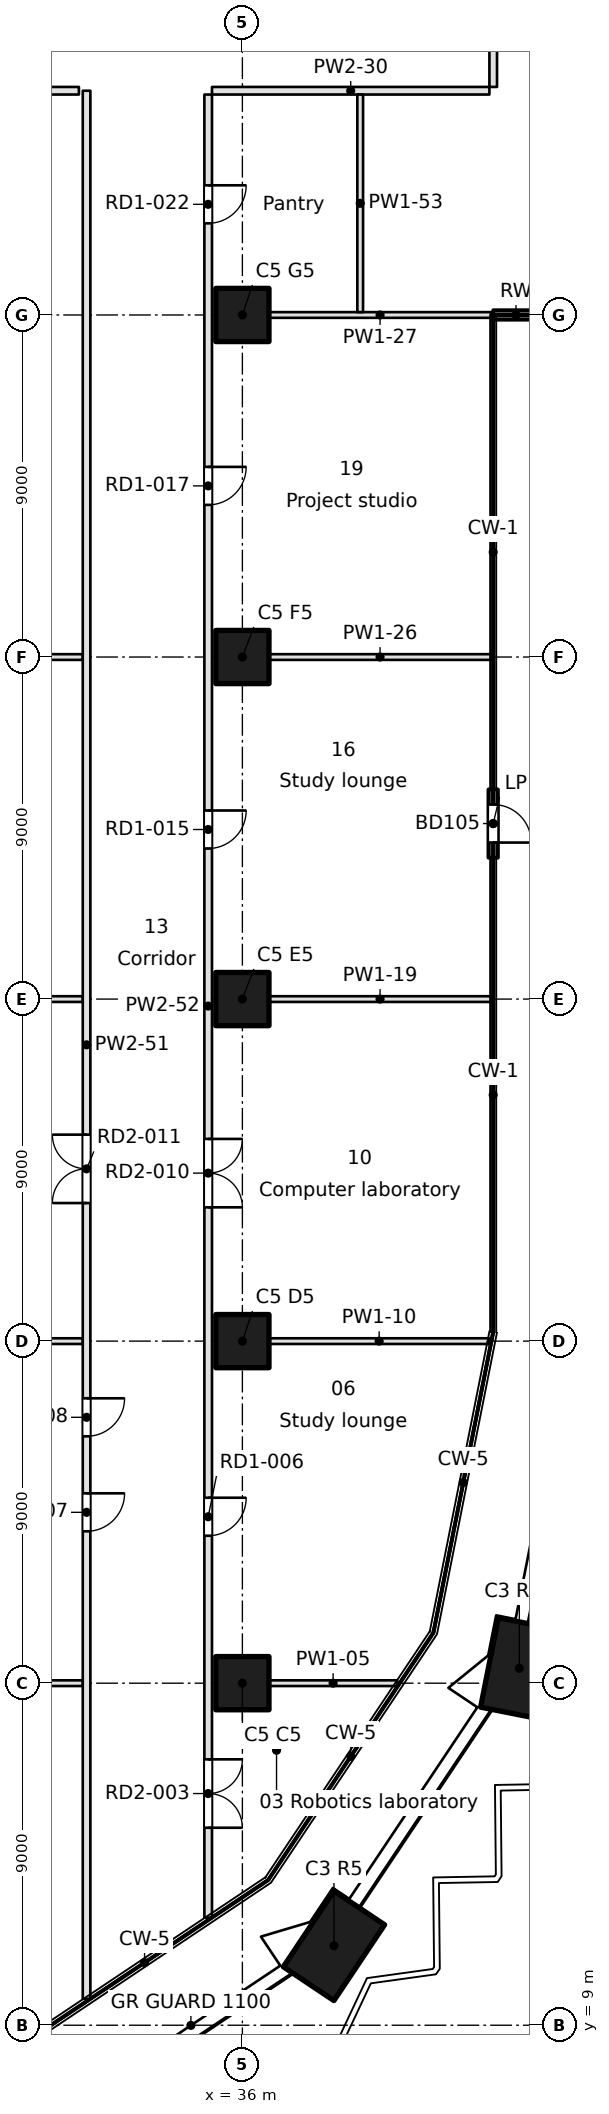
"""IFC4 building model, lengths in metres.
Left out: names, types, materials, properties, quantities, classifications, styles, units other than length and angle.
Written with IfcOpenShell. Run it as: python <this file> out.ifc"""

import sys

from ifc_helpers import new_model, si_unit, direction, frame, frame_2d, origin, origin_2d, place, context, subcontext, project, spatial, rectangle, extrude, element, fill, save


model = new_model("IFC4")
c1 = context("Model", 3, precision=1e-05, world=origin(), true_north=direction((0.0, 1.0)))
c2 = subcontext(c1, "Body", "Model", "MODEL_VIEW")
j1 = project(units=[si_unit("LENGTHUNIT", "METRE"), si_unit("PLANEANGLEUNIT", "RADIAN")], contexts=[c1])
p1 = place(None, origin())
s1 = spatial("IfcSite", under=j1, at=p1, CompositionType="ELEMENT")
p2 = place(p1, origin())
s2 = spatial("IfcBuilding", under=s1, at=p2, CompositionType="ELEMENT")
p3 = place(p2, frame((0.0, 0.0, 35.8)))
s3 = spatial("IfcBuildingStorey", under=s2, at=p3, CompositionType="ELEMENT", Elevation=35.8)
for number, where, z_axis, x_axis in (
    (1, (38.41, 11.09, 0.0), (0.0, 0.0, 1.0), (0.556, 0.831, 0.0)),
    (2, (43.287, 18.39, 0.0), (0.0, 0.0, 1.0), (0.195, 0.981, 0.0)),
):
    element("IfcColumn", number, at=place(p3, frame(where, z_axis=z_axis, x_axis=x_axis)), inside=s3, PredefinedType="COLUMN", context=c2, shape_type="SweptSolid", body=[
        extrude(rectangle(XDim=2.4, YDim=1.6, at=origin_2d()), origin(), (0.0, 0.0, 1.0), 3.7),
    ])
for number, where, z_axis, x_axis in (
    (3, (36.0, 18.0, 0.0), (0.0, 0.0, 1.0), (1.0, 0.0, 0.0)),
    (4, (36.0, 27.0, 0.0), (0.0, 0.0, 1.0), (1.0, 0.0, 0.0)),
    (5, (36.0, 36.0, 0.0), (0.0, 0.0, 1.0), (1.0, 0.0, 0.0)),
    (6, (36.0, 45.0, 0.0), (0.0, 0.0, 1.0), (1.0, 0.0, 0.0)),
    (7, (36.0, 54.0, 0.0), (0.0, 0.0, 1.0), (1.0, 0.0, 0.0)),
):
    element("IfcColumn", number, at=place(p3, frame(where, z_axis=z_axis, x_axis=x_axis)), inside=s3, PredefinedType="COLUMN", context=c2, shape_type="SweptSolid", body=[
        extrude(rectangle(XDim=1.4, YDim=1.4, at=origin_2d()), origin(), (0.0, 0.0, 1.0), 3.7),
    ])
p4 = place(p3, frame((42.599, 39.718, 0.0), z_axis=(0.0, 0.0, 1.0), x_axis=(0.0, 1.0, 0.0)))
e8 = element("IfcWall", 8, at=p4, inside=s3, PredefinedType="SOLIDWALL", context=c2, shape_type="SweptSolid", body=[
    extrude(rectangle(XDim=1.8, YDim=0.25, at=frame_2d((0.9, 0.0))), origin(), (0.0, 0.0, 1.0), 3.3),
])
p5 = place(p4, frame((0.4, 0.0, 0.0)))
e9 = element("IfcOpeningElement", 9, at=p5, cuts=e8, PredefinedType="OPENING", context=c2, shape_type="SweptSolid", body=[
    extrude(rectangle(XDim=1.0, YDim=2.1, at=frame_2d((0.5, 1.05))), frame((0.0, 0.125, 0.0), z_axis=(0.0, -1.0, 0.0), x_axis=(1.0, 0.0, 0.0)), (0.0, 0.0, 1.0), 0.25),
])
p6 = place(p3, frame((42.599, 54.0, 0.0), z_axis=(0.0, 0.0, 1.0), x_axis=(0.999999917344, 0.000406586671, 0.0)))
e10 = element("IfcWall", 10, at=p6, inside=s3, PredefinedType="SOLIDWALL", context=c2, shape_type="SweptSolid", body=[
    extrude(rectangle(XDim=1.201, YDim=0.25, at=frame_2d((0.601, 0.0))), origin(), (0.0, 0.0, 1.0), 3.3),
])
p7 = place(p3, frame((28.2, 18.0, 0.0), z_axis=(0.0, 0.0, 1.0), x_axis=(1.0, 0.0, 0.0)))
e11 = element("IfcWall", 11, at=p7, inside=s3, PredefinedType="PARTITIONING", context=c2, shape_type="SweptSolid", body=[
    extrude(rectangle(XDim=3.6, YDim=0.15, at=frame_2d((1.8, 0.0))), origin(), (0.0, 0.0, 1.0), 3.3),
])
p8 = place(p3, frame((36.7, 18.0, 0.0), z_axis=(0.0, 0.0, 1.0), x_axis=(1.0, 0.0, 0.0)))
e12 = element("IfcWall", 12, at=p8, inside=s3, PredefinedType="PARTITIONING", context=c2, shape_type="SweptSolid", body=[
    extrude(rectangle(XDim=3.375, YDim=0.15, at=frame_2d((1.687, 0.0))), origin(), (0.0, 0.0, 1.0), 3.3),
])
p9 = place(p3, frame((27.7, 27.0, 0.0), z_axis=(0.0, 0.0, 1.0), x_axis=(1.0, 0.0, 0.0)))
e13 = element("IfcWall", 13, at=p9, inside=s3, PredefinedType="PARTITIONING", context=c2, shape_type="SweptSolid", body=[
    extrude(rectangle(XDim=4.1, YDim=0.15, at=frame_2d((2.05, 0.0))), origin(), (0.0, 0.0, 1.0), 3.3),
])
p10 = place(p3, frame((36.7, 27.0, 0.0), z_axis=(0.0, 0.0, 1.0), x_axis=(1.0, 0.0, 0.0)))
e14 = element("IfcWall", 14, at=p10, inside=s3, PredefinedType="PARTITIONING", context=c2, shape_type="SweptSolid", body=[
    extrude(rectangle(XDim=5.797, YDim=0.15, at=frame_2d((2.898, 0.0))), origin(), (0.0, 0.0, 1.0), 3.3),
])
p11 = place(p3, frame((27.7, 36.0, 0.0), z_axis=(0.0, 0.0, 1.0), x_axis=(1.0, 0.0, 0.0)))
e15 = element("IfcWall", 15, at=p11, inside=s3, PredefinedType="PARTITIONING", context=c2, shape_type="SweptSolid", body=[
    extrude(rectangle(XDim=4.1, YDim=0.15, at=frame_2d((2.05, 0.0))), origin(), (0.0, 0.0, 1.0), 3.3),
])
p12 = place(p3, frame((36.7, 36.0, 0.0), z_axis=(0.0, 0.0, 1.0), x_axis=(1.0, 0.0, 0.0)))
e16 = element("IfcWall", 16, at=p12, inside=s3, PredefinedType="PARTITIONING", context=c2, shape_type="SweptSolid", body=[
    extrude(rectangle(XDim=5.845, YDim=0.15, at=frame_2d((2.922, 0.0))), origin(), (0.0, 0.0, 1.0), 3.3),
])
p13 = place(p3, frame((27.7, 45.0, 0.0), z_axis=(0.0, 0.0, 1.0), x_axis=(1.0, 0.0, 0.0)))
e17 = element("IfcWall", 17, at=p13, inside=s3, PredefinedType="PARTITIONING", context=c2, shape_type="SweptSolid", body=[
    extrude(rectangle(XDim=4.1, YDim=0.15, at=frame_2d((2.05, 0.0))), origin(), (0.0, 0.0, 1.0), 3.3),
])
for number, where, z_axis, x_axis in (
    (18, (36.7, 45.0, 0.0), (0.0, 0.0, 1.0), (1.0, 0.0, 0.0)),
    (19, (36.7, 54.0, 0.0), (0.0, 0.0, 1.0), (1.0, 0.0, 0.0)),
):
    element("IfcWall", number, at=place(p3, frame(where, z_axis=z_axis, x_axis=x_axis)), inside=s3, PredefinedType="PARTITIONING", context=c2, shape_type="SweptSolid", body=[
        extrude(rectangle(XDim=5.845, YDim=0.15, at=frame_2d((2.922, 0.0))), origin(), (0.0, 0.0, 1.0), 3.3),
    ])
p14 = place(p3, frame((31.698, 59.9, 0.0), z_axis=(0.0, 0.0, 1.0), x_axis=(-1.0, 0.0, 0.0)))
e20 = element("IfcWall", 20, at=p14, inside=s3, PredefinedType="PARTITIONING", context=c2, shape_type="SweptSolid", body=[
    extrude(rectangle(XDim=14.37, YDim=0.2, at=frame_2d((7.185, 0.0))), origin(), (0.0, 0.0, 1.0), 3.3),
])
p15 = place(p3, frame((42.5, 59.9, 0.0), z_axis=(0.0, 0.0, 1.0), x_axis=(-1.0, 0.0, 0.0)))
e21 = element("IfcWall", 21, at=p15, inside=s3, PredefinedType="PARTITIONING", context=c2, shape_type="SweptSolid", body=[
    extrude(rectangle(XDim=7.3, YDim=0.2, at=frame_2d((3.65, 0.0))), origin(), (0.0, 0.0, 1.0), 3.3),
])
p16 = place(p3, frame((31.9, 9.693, 0.0), z_axis=(0.0, 0.0, 1.0), x_axis=(0.0, 1.0, 0.0)))
e22 = element("IfcWall", 22, at=p16, inside=s3, PredefinedType="PARTITIONING", context=c2, shape_type="SweptSolid", body=[
    extrude(rectangle(XDim=50.207, YDim=0.2, at=frame_2d((25.104, 0.0))), origin(), (0.0, 0.0, 1.0), 3.3),
])
p17 = place(p16, frame((12.303, 0.0, 0.0)))
e23 = element("IfcOpeningElement", 23, at=p17, cuts=e22, PredefinedType="OPENING", context=c2, shape_type="SweptSolid", body=[
    extrude(rectangle(XDim=1.0, YDim=2.1, at=frame_2d((0.5, 1.05))), frame((0.0, 0.1, 0.0), z_axis=(0.0, -1.0, 0.0), x_axis=(1.0, 0.0, 0.0)), (0.0, 0.0, 1.0), 0.2),
])
p18 = place(p16, frame((14.803, 0.0, 0.0)))
e24 = element("IfcOpeningElement", 24, at=p18, cuts=e22, PredefinedType="OPENING", context=c2, shape_type="SweptSolid", body=[
    extrude(rectangle(XDim=1.0, YDim=2.1, at=frame_2d((0.5, 1.05))), frame((0.0, 0.1, 0.0), z_axis=(0.0, -1.0, 0.0), x_axis=(1.0, 0.0, 0.0)), (0.0, 0.0, 1.0), 0.2),
])
p19 = place(p16, frame((20.94, 0.0, 0.0)))
e25 = element("IfcOpeningElement", 25, at=p19, cuts=e22, PredefinedType="OPENING", context=c2, shape_type="SweptSolid", body=[
    extrude(rectangle(XDim=1.8, YDim=2.1, at=frame_2d((0.9, 1.05))), frame((0.0, 0.1, 0.0), z_axis=(0.0, -1.0, 0.0), x_axis=(1.0, 0.0, 0.0)), (0.0, 0.0, 1.0), 0.2),
])
p20 = place(p3, frame((35.1, 59.8, 0.0), z_axis=(0.0, 0.0, 1.0), x_axis=(0.0, -1.0, 0.0)))
e26 = element("IfcWall", 26, at=p20, inside=s3, PredefinedType="PARTITIONING", context=c2, shape_type="SweptSolid", body=[
    extrude(rectangle(XDim=47.969, YDim=0.2, at=frame_2d((23.984, 0.0))), origin(), (0.0, 0.0, 1.0), 3.3),
])
p21 = place(p20, frame((43.804, 0.0, 0.0)))
e27 = element("IfcOpeningElement", 27, at=p21, cuts=e26, PredefinedType="OPENING", context=c2, shape_type="SweptSolid", body=[
    extrude(rectangle(XDim=1.8, YDim=2.1, at=frame_2d((0.9, 1.05))), frame((0.0, 0.1, 0.0), z_axis=(0.0, -1.0, 0.0), x_axis=(1.0, 0.0, 0.0)), (0.0, 0.0, 1.0), 0.2),
])
p22 = place(p20, frame((36.921, 0.0, 0.0)))
e28 = element("IfcOpeningElement", 28, at=p22, cuts=e26, PredefinedType="OPENING", context=c2, shape_type="SweptSolid", body=[
    extrude(rectangle(XDim=1.0, YDim=2.1, at=frame_2d((0.5, 1.05))), frame((0.0, 0.1, 0.0), z_axis=(0.0, -1.0, 0.0), x_axis=(1.0, 0.0, 0.0)), (0.0, 0.0, 1.0), 0.2),
])
p23 = place(p20, frame((27.479, 0.0, 0.0)))
e29 = element("IfcOpeningElement", 29, at=p23, cuts=e26, PredefinedType="OPENING", context=c2, shape_type="SweptSolid", body=[
    extrude(rectangle(XDim=1.8, YDim=2.1, at=frame_2d((0.9, 1.05))), frame((0.0, 0.1, 0.0), z_axis=(0.0, -1.0, 0.0), x_axis=(1.0, 0.0, 0.0)), (0.0, 0.0, 1.0), 0.2),
])
p24 = place(p20, frame((18.838, 0.0, 0.0)))
e30 = element("IfcOpeningElement", 30, at=p24, cuts=e26, PredefinedType="OPENING", context=c2, shape_type="SweptSolid", body=[
    extrude(rectangle(XDim=1.0, YDim=2.1, at=frame_2d((0.5, 1.05))), frame((0.0, 0.1, 0.0), z_axis=(0.0, -1.0, 0.0), x_axis=(1.0, 0.0, 0.0)), (0.0, 0.0, 1.0), 0.2),
])
p25 = place(p20, frame((9.797, 0.0, 0.0)))
e31 = element("IfcOpeningElement", 31, at=p25, cuts=e26, PredefinedType="OPENING", context=c2, shape_type="SweptSolid", body=[
    extrude(rectangle(XDim=1.0, YDim=2.1, at=frame_2d((0.5, 1.05))), frame((0.0, 0.1, 0.0), z_axis=(0.0, -1.0, 0.0), x_axis=(1.0, 0.0, 0.0)), (0.0, 0.0, 1.0), 0.2),
])
p26 = place(p20, frame((2.388, 0.0, 0.0)))
e32 = element("IfcOpeningElement", 32, at=p26, cuts=e26, PredefinedType="OPENING", context=c2, shape_type="SweptSolid", body=[
    extrude(rectangle(XDim=1.0, YDim=2.1, at=frame_2d((0.5, 1.05))), frame((0.0, 0.1, 0.0), z_axis=(0.0, -1.0, 0.0), x_axis=(1.0, 0.0, 0.0)), (0.0, 0.0, 1.0), 0.2),
])
p27 = place(p3, frame((39.1, 59.8, 0.0), z_axis=(0.0, 0.0, 1.0), x_axis=(0.0, -1.0, 0.0)))
e33 = element("IfcWall", 33, at=p27, inside=s3, PredefinedType="PARTITIONING", context=c2, shape_type="SweptSolid", body=[
    extrude(rectangle(XDim=5.725, YDim=0.15, at=frame_2d((2.863, 0.0))), origin(), (0.0, 0.0, 1.0), 3.3),
])
p28 = place(p3, frame((42.6, 63.6, 0.0), z_axis=(0.0, 0.0, 1.0), x_axis=(0.0, -1.0, 0.0)))
e34 = element("IfcWall", 34, at=p28, inside=s3, PredefinedType="PARTITIONING", context=c2, shape_type="SweptSolid", body=[
    extrude(rectangle(XDim=3.6, YDim=0.2, at=frame_2d((1.8, 0.0))), origin(), (0.0, 0.0, 1.0), 3.3),
])
p29 = place(p5, frame((1.0, 0.0, 0.0), z_axis=(0.0, 0.0, 1.0), x_axis=(-1.0, 0.0, 0.0)))
e35 = element("IfcDoor", 35, at=p29, inside=s3, OperationType="SINGLE_SWING_RIGHT", PredefinedType="DOOR", context=c2, shape_type="SweptSolid", body=[
    extrude(rectangle(XDim=1.0, YDim=2.1, at=frame_2d((0.5, 1.05))), frame((0.0, 0.025, 0.0), z_axis=(0.0, -1.0, 0.0), x_axis=(1.0, 0.0, 0.0)), (0.0, 0.0, 1.0), 0.05),
])
fill(e9, e35)
p30 = place(p21, origin())
e36 = element("IfcDoor", 36, at=p30, inside=s3, OperationType="DOUBLE_DOOR_SINGLE_SWING", PredefinedType="DOOR", context=c2, shape_type="SweptSolid", body=[
    extrude(rectangle(XDim=1.8, YDim=2.1, at=frame_2d((0.9, 1.05))), frame((0.0, 0.025, 0.0), z_axis=(0.0, -1.0, 0.0), x_axis=(1.0, 0.0, 0.0)), (0.0, 0.0, 1.0), 0.05),
])
fill(e27, e36)
p31 = place(p22, origin())
e37 = element("IfcDoor", 37, at=p31, inside=s3, OperationType="SINGLE_SWING_LEFT", PredefinedType="DOOR", context=c2, shape_type="SweptSolid", body=[
    extrude(rectangle(XDim=1.0, YDim=2.1, at=frame_2d((0.5, 1.05))), frame((0.0, 0.025, 0.0), z_axis=(0.0, -1.0, 0.0), x_axis=(1.0, 0.0, 0.0)), (0.0, 0.0, 1.0), 0.05),
])
fill(e28, e37)
p32 = place(p17, frame((1.0, 0.0, 0.0), z_axis=(0.0, 0.0, 1.0), x_axis=(-1.0, 0.0, 0.0)))
e38 = element("IfcDoor", 38, at=p32, inside=s3, OperationType="SINGLE_SWING_LEFT", PredefinedType="DOOR", context=c2, shape_type="SweptSolid", body=[
    extrude(rectangle(XDim=1.0, YDim=2.1, at=frame_2d((0.5, 1.05))), frame((0.0, 0.025, 0.0), z_axis=(0.0, -1.0, 0.0), x_axis=(1.0, 0.0, 0.0)), (0.0, 0.0, 1.0), 0.05),
])
fill(e23, e38)
p33 = place(p18, frame((1.0, 0.0, 0.0), z_axis=(0.0, 0.0, 1.0), x_axis=(-1.0, 0.0, 0.0)))
e39 = element("IfcDoor", 39, at=p33, inside=s3, OperationType="SINGLE_SWING_LEFT", PredefinedType="DOOR", context=c2, shape_type="SweptSolid", body=[
    extrude(rectangle(XDim=1.0, YDim=2.1, at=frame_2d((0.5, 1.05))), frame((0.0, 0.025, 0.0), z_axis=(0.0, -1.0, 0.0), x_axis=(1.0, 0.0, 0.0)), (0.0, 0.0, 1.0), 0.05),
])
fill(e24, e39)
p34 = place(p23, origin())
e40 = element("IfcDoor", 40, at=p34, inside=s3, OperationType="DOUBLE_DOOR_SINGLE_SWING", PredefinedType="DOOR", context=c2, shape_type="SweptSolid", body=[
    extrude(rectangle(XDim=1.8, YDim=2.1, at=frame_2d((0.9, 1.05))), frame((0.0, 0.025, 0.0), z_axis=(0.0, -1.0, 0.0), x_axis=(1.0, 0.0, 0.0)), (0.0, 0.0, 1.0), 0.05),
])
fill(e29, e40)
p35 = place(p19, origin())
e41 = element("IfcDoor", 41, at=p35, inside=s3, OperationType="DOUBLE_DOOR_SINGLE_SWING", PredefinedType="DOOR", context=c2, shape_type="SweptSolid", body=[
    extrude(rectangle(XDim=1.8, YDim=2.1, at=frame_2d((0.9, 1.05))), frame((0.0, 0.025, 0.0), z_axis=(0.0, -1.0, 0.0), x_axis=(1.0, 0.0, 0.0)), (0.0, 0.0, 1.0), 0.05),
])
fill(e25, e41)
p36 = place(p24, origin())
e42 = element("IfcDoor", 42, at=p36, inside=s3, OperationType="SINGLE_SWING_LEFT", PredefinedType="DOOR", context=c2, shape_type="SweptSolid", body=[
    extrude(rectangle(XDim=1.0, YDim=2.1, at=frame_2d((0.5, 1.05))), frame((0.0, 0.025, 0.0), z_axis=(0.0, -1.0, 0.0), x_axis=(1.0, 0.0, 0.0)), (0.0, 0.0, 1.0), 0.05),
])
fill(e30, e42)
p37 = place(p25, origin())
e43 = element("IfcDoor", 43, at=p37, inside=s3, OperationType="SINGLE_SWING_LEFT", PredefinedType="DOOR", context=c2, shape_type="SweptSolid", body=[
    extrude(rectangle(XDim=1.0, YDim=2.1, at=frame_2d((0.5, 1.05))), frame((0.0, 0.025, 0.0), z_axis=(0.0, -1.0, 0.0), x_axis=(1.0, 0.0, 0.0)), (0.0, 0.0, 1.0), 0.05),
])
fill(e31, e43)
p38 = place(p26, origin())
e44 = element("IfcDoor", 44, at=p38, inside=s3, OperationType="SINGLE_SWING_LEFT", PredefinedType="DOOR", context=c2, shape_type="SweptSolid", body=[
    extrude(rectangle(XDim=1.0, YDim=2.1, at=frame_2d((0.5, 1.05))), frame((0.0, 0.025, 0.0), z_axis=(0.0, -1.0, 0.0), x_axis=(1.0, 0.0, 0.0)), (0.0, 0.0, 1.0), 0.05),
])
fill(e32, e44)
save(model, sys.argv[1])
